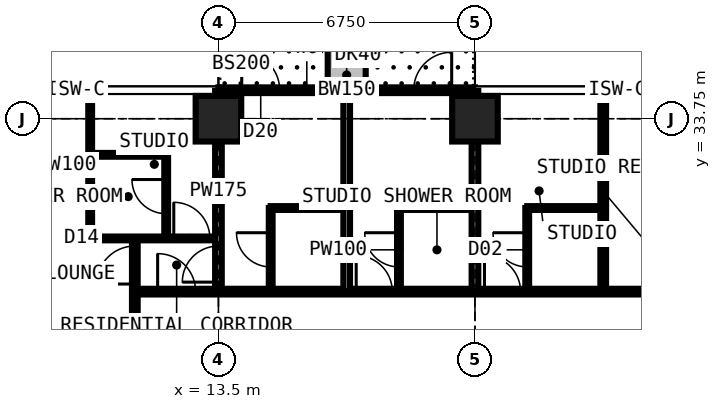
"""IFC4 building model, lengths in metres.
Left out: names, types, materials, properties, quantities, classifications, styles, units other than length and angle.
Written with IfcOpenShell. Run it as: python <this file> out.ifc"""

import sys

from ifc_helpers import new_model, si_unit, direction, frame, frame_2d, origin, origin_2d, place, context, subcontext, project, spatial, rectangle, extrude, element, fill, save


model = new_model("IFC4")
c1 = context("Model", 3, precision=1e-05, world=origin(), true_north=direction((0.0, 1.0)))
c2 = subcontext(c1, "Body", "Model", "MODEL_VIEW")
j1 = project(units=[si_unit("LENGTHUNIT", "METRE"), si_unit("PLANEANGLEUNIT", "RADIAN")], contexts=[c1])
p1 = place(None, origin())
s1 = spatial("IfcSite", under=j1, at=p1, CompositionType="ELEMENT")
p2 = place(p1, origin())
s2 = spatial("IfcBuilding", under=s1, at=p2, CompositionType="ELEMENT")
p3 = place(p2, frame((0.0, 0.0, 185.4)))
s3 = spatial("IfcBuildingStorey", under=s2, at=p3, CompositionType="ELEMENT", Elevation=185.4)
for number, where, z_axis, x_axis in (
    (1, (13.5, 33.75, 0.0), (0.0, 0.0, 1.0), (1.0, 0.0, 0.0)),
    (2, (20.25, 33.75, 0.0), (0.0, 0.0, 1.0), (1.0, 0.0, 0.0)),
):
    element("IfcColumn", number, at=place(p3, frame(where, z_axis=z_axis, x_axis=x_axis)), inside=s3, PredefinedType="COLUMN", context=c2, shape_type="SweptSolid", body=[
        extrude(rectangle(XDim=1.2, YDim=1.2, at=origin_2d()), origin(), (0.0, 0.0, 1.0), 3.6),
    ])
p4 = place(p3, frame((13.5, 34.5, 0.0), z_axis=(0.0, 0.0, 1.0), x_axis=(1.0, 0.0, 0.0)))
e3 = element("IfcWall", 3, at=p4, inside=s3, PredefinedType="SOLIDWALL", context=c2, shape_type="SweptSolid", body=[
    extrude(rectangle(XDim=6.75, YDim=0.15, at=frame_2d((3.375, 0.0))), origin(), (0.0, 0.0, 1.0), 3.375),
])
p5 = place(p4, frame((0.613, 0.0, 0.0)))
e4 = element("IfcOpeningElement", 4, at=p5, cuts=e3, PredefinedType="OPENING", context=c2, shape_type="SweptSolid", body=[
    extrude(rectangle(XDim=1.0, YDim=2.2, at=frame_2d((0.5, 1.1))), frame((0.0, 0.085, 0.0), z_axis=(0.0, -1.0, 0.0), x_axis=(1.0, 0.0, 0.0)), (0.0, 0.0, 1.0), 0.17),
])
p6 = place(p4, frame((1.725, 0.0, 0.9)))
e5 = element("IfcOpeningElement", 5, at=p6, cuts=e3, PredefinedType="OPENING", context=c2, shape_type="SweptSolid", body=[
    extrude(rectangle(XDim=1.2, YDim=1.8, at=frame_2d((0.6, 0.9))), frame((0.0, 0.085, 0.0), z_axis=(0.0, -1.0, 0.0), x_axis=(1.0, 0.0, 0.0)), (0.0, 0.0, 1.0), 0.17),
])
p7 = place(p4, frame((5.137, 0.0, 0.0)))
e6 = element("IfcOpeningElement", 6, at=p7, cuts=e3, PredefinedType="OPENING", context=c2, shape_type="SweptSolid", body=[
    extrude(rectangle(XDim=1.0, YDim=2.2, at=frame_2d((0.5, 1.1))), frame((0.0, 0.085, 0.0), z_axis=(0.0, -1.0, 0.0), x_axis=(1.0, 0.0, 0.0)), (0.0, 0.0, 1.0), 0.17),
])
p8 = place(p4, frame((3.825, 0.0, 0.9)))
e7 = element("IfcOpeningElement", 7, at=p8, cuts=e3, PredefinedType="OPENING", context=c2, shape_type="SweptSolid", body=[
    extrude(rectangle(XDim=1.2, YDim=1.8, at=frame_2d((0.6, 0.9))), frame((0.0, 0.085, 0.0), z_axis=(0.0, -1.0, 0.0), x_axis=(1.0, 0.0, 0.0)), (0.0, 0.0, 1.0), 0.17),
])
p9 = place(p3, frame((16.875, 34.6, 0.0), z_axis=(0.0, 0.0, 1.0), x_axis=(0.0, 1.0, 0.0)))
e8 = element("IfcWall", 8, at=p9, inside=s3, PredefinedType="USERDEFINED", context=c2, shape_type="SweptSolid", body=[
    extrude(rectangle(XDim=2.2, YDim=1.0, at=frame_2d((1.1, 0.0))), origin(), (0.0, 0.0, 1.0), 0.9),
])
p10 = place(p3, frame((10.125, 30.6, 0.0), z_axis=(0.0, 0.0, 1.0), x_axis=(0.0, 1.0, 0.0)))
e9 = element("IfcWall", 9, at=p10, inside=s3, PredefinedType="PARTITIONING", context=c2, shape_type="SweptSolid", body=[
    extrude(rectangle(XDim=3.884, YDim=0.1, at=frame_2d((1.942, 0.0))), origin(), (0.0, 0.0, 1.0), 3.375),
])
p11 = place(p3, frame((10.125, 30.6, 0.0), z_axis=(0.0, 0.0, 1.0), x_axis=(1.0, 0.0, 0.0)))
e10 = element("IfcWall", 10, at=p11, inside=s3, PredefinedType="PARTITIONING", context=c2, shape_type="SweptSolid", body=[
    extrude(rectangle(XDim=3.375, YDim=0.1, at=frame_2d((1.688, 0.0))), origin(), (0.0, 0.0, 1.0), 3.375),
])
p12 = place(p11, frame((2.2, 0.0, 0.0)))
e11 = element("IfcOpeningElement", 11, at=p12, cuts=e10, PredefinedType="OPENING", context=c2, shape_type="SweptSolid", body=[
    extrude(rectangle(XDim=0.95, YDim=2.2, at=frame_2d((0.475, 1.1))), frame((0.0, 0.06, 0.0), z_axis=(0.0, -1.0, 0.0), x_axis=(1.0, 0.0, 0.0)), (0.0, 0.0, 1.0), 0.12),
])
p13 = place(p3, frame((10.125, 32.8, 0.0), z_axis=(0.0, 0.0, 1.0), x_axis=(1.0, 0.0, 0.0)))
e12 = element("IfcWall", 12, at=p13, inside=s3, PredefinedType="PARTITIONING", context=c2, shape_type="SweptSolid", body=[
    extrude(rectangle(XDim=2.0, YDim=0.1, at=frame_2d((1.0, 0.0))), origin(), (0.0, 0.0, 1.0), 3.375),
])
p14 = place(p3, frame((11.3, 11.3, 0.0), z_axis=(0.0, 0.0, 1.0), x_axis=(0.0, 1.0, 0.0)))
e13 = element("IfcWall", 13, at=p14, inside=s3, PredefinedType="PARTITIONING", context=c2, shape_type="SweptSolid", body=[
    extrude(rectangle(XDim=19.3, YDim=0.15, at=frame_2d((9.65, 0.0))), origin(), (0.0, 0.0, 1.0), 3.375),
])
p15 = place(p14, frame((18.1, 0.0, 0.0)))
e14 = element("IfcOpeningElement", 14, at=p15, cuts=e13, PredefinedType="OPENING", context=c2, shape_type="SweptSolid", body=[
    extrude(rectangle(XDim=1.0, YDim=2.2, at=frame_2d((0.5, 1.1))), frame((0.0, 0.085, 0.0), z_axis=(0.0, -1.0, 0.0), x_axis=(1.0, 0.0, 0.0)), (0.0, 0.0, 1.0), 0.17),
])
p16 = place(p14, frame((10.137, 0.0, 0.0)))
e15 = element("IfcOpeningElement", 15, at=p16, cuts=e13, PredefinedType="OPENING", context=c2, shape_type="SweptSolid", body=[
    extrude(rectangle(XDim=1.0, YDim=2.2, at=frame_2d((0.5, 1.1))), frame((0.0, 0.085, 0.0), z_axis=(0.0, -1.0, 0.0), x_axis=(1.0, 0.0, 0.0)), (0.0, 0.0, 1.0), 0.17),
])
p17 = place(p3, frame((11.3, 29.2, 0.0), z_axis=(0.0, 0.0, 1.0), x_axis=(1.0, 0.0, 0.0)))
e16 = element("IfcWall", 16, at=p17, inside=s3, PredefinedType="PARTITIONING", context=c2, shape_type="SweptSolid", body=[
    extrude(rectangle(XDim=19.809, YDim=0.15, at=frame_2d((9.904, 0.0))), origin(), (0.0, 0.0, 1.0), 3.375),
])
p18 = place(p17, frame((14.625, 0.0, 0.0)))
e17 = element("IfcOpeningElement", 17, at=p18, cuts=e16, PredefinedType="OPENING", context=c2, shape_type="SweptSolid", body=[
    extrude(rectangle(XDim=1.0, YDim=2.2, at=frame_2d((0.5, 1.1))), frame((0.0, 0.085, 0.0), z_axis=(0.0, -1.0, 0.0), x_axis=(1.0, 0.0, 0.0)), (0.0, 0.0, 1.0), 0.17),
])
p19 = place(p17, frame((5.825, 0.0, 0.0)))
e18 = element("IfcOpeningElement", 18, at=p19, cuts=e16, PredefinedType="OPENING", context=c2, shape_type="SweptSolid", body=[
    extrude(rectangle(XDim=0.95, YDim=2.2, at=frame_2d((0.475, 1.1))), frame((0.0, 0.085, 0.0), z_axis=(0.0, -1.0, 0.0), x_axis=(1.0, 0.0, 0.0)), (0.0, 0.0, 1.0), 0.17),
])
p20 = place(p17, frame((9.2, 0.0, 0.0)))
e19 = element("IfcOpeningElement", 19, at=p20, cuts=e16, PredefinedType="OPENING", context=c2, shape_type="SweptSolid", body=[
    extrude(rectangle(XDim=0.95, YDim=2.2, at=frame_2d((0.475, 1.1))), frame((0.0, 0.085, 0.0), z_axis=(0.0, -1.0, 0.0), x_axis=(1.0, 0.0, 0.0)), (0.0, 0.0, 1.0), 0.17),
])
p21 = place(p17, frame((0.6, 0.0, 0.0)))
e20 = element("IfcOpeningElement", 20, at=p21, cuts=e16, PredefinedType="OPENING", context=c2, shape_type="SweptSolid", body=[
    extrude(rectangle(XDim=1.0, YDim=2.2, at=frame_2d((0.5, 1.1))), frame((0.0, 0.085, 0.0), z_axis=(0.0, -1.0, 0.0), x_axis=(1.0, 0.0, 0.0)), (0.0, 0.0, 1.0), 0.17),
])
p22 = place(p3, frame((12.125, 30.6, 0.0), z_axis=(0.0, 0.0, 1.0), x_axis=(0.0, 1.0, 0.0)))
e21 = element("IfcWall", 21, at=p22, inside=s3, PredefinedType="PARTITIONING", context=c2, shape_type="SweptSolid", body=[
    extrude(rectangle(XDim=2.2, YDim=0.1, at=frame_2d((1.1, 0.0))), origin(), (0.0, 0.0, 1.0), 3.375),
])
p23 = place(p22, frame((0.65, 0.0, 0.0)))
e22 = element("IfcOpeningElement", 22, at=p23, cuts=e21, PredefinedType="OPENING", context=c2, shape_type="SweptSolid", body=[
    extrude(rectangle(XDim=0.9, YDim=2.2, at=frame_2d((0.45, 1.1))), frame((0.0, 0.06, 0.0), z_axis=(0.0, -1.0, 0.0), x_axis=(1.0, 0.0, 0.0)), (0.0, 0.0, 1.0), 0.12),
])
p24 = place(p3, frame((13.5, 29.2, 0.0), z_axis=(0.0, 0.0, 1.0), x_axis=(0.0, 1.0, 0.0)))
e23 = element("IfcWall", 23, at=p24, inside=s3, PredefinedType="PARTITIONING", context=c2, shape_type="SweptSolid", body=[
    extrude(rectangle(XDim=5.284, YDim=0.175, at=frame_2d((2.642, 0.0))), origin(), (0.0, 0.0, 1.0), 2.806),
])
p25 = place(p24, frame((0.25, 0.0, 0.0)))
e24 = element("IfcOpeningElement", 24, at=p25, cuts=e23, PredefinedType="OPENING", context=c2, shape_type="SweptSolid", body=[
    extrude(rectangle(XDim=0.95, YDim=2.2, at=frame_2d((0.475, 1.1))), frame((0.0, 0.097, 0.0), z_axis=(0.0, -1.0, 0.0), x_axis=(1.0, 0.0, 0.0)), (0.0, 0.0, 1.0), 0.195),
])
p26 = place(p3, frame((14.875, 29.2, 0.0), z_axis=(0.0, 0.0, 1.0), x_axis=(0.0, 1.0, 0.0)))
e25 = element("IfcWall", 25, at=p26, inside=s3, PredefinedType="PARTITIONING", context=c2, shape_type="SweptSolid", body=[
    extrude(rectangle(XDim=2.2, YDim=0.1, at=frame_2d((1.1, 0.0))), origin(), (0.0, 0.0, 1.0), 3.375),
])
p27 = place(p26, frame((0.65, 0.0, 0.0)))
e26 = element("IfcOpeningElement", 26, at=p27, cuts=e25, PredefinedType="OPENING", context=c2, shape_type="SweptSolid", body=[
    extrude(rectangle(XDim=0.9, YDim=2.2, at=frame_2d((0.45, 1.1))), frame((0.0, 0.06, 0.0), z_axis=(0.0, -1.0, 0.0), x_axis=(1.0, 0.0, 0.0)), (0.0, 0.0, 1.0), 0.12),
])
p28 = place(p3, frame((14.875, 31.4, 0.0), z_axis=(0.0, 0.0, 1.0), x_axis=(1.0, 0.0, 0.0)))
e27 = element("IfcWall", 27, at=p28, inside=s3, PredefinedType="PARTITIONING", context=c2, shape_type="SweptSolid", body=[
    extrude(rectangle(XDim=2.0, YDim=0.1, at=frame_2d((1.0, 0.0))), origin(), (0.0, 0.0, 1.0), 3.375),
])
p29 = place(p3, frame((16.875, 29.2, 0.0), z_axis=(0.0, 0.0, 1.0), x_axis=(0.0, 1.0, 0.0)))
e28 = element("IfcWall", 28, at=p29, inside=s3, PredefinedType="PARTITIONING", context=c2, shape_type="SweptSolid", body=[
    extrude(rectangle(XDim=5.284, YDim=0.175, at=frame_2d((2.642, 0.0))), origin(), (0.0, 0.0, 1.0), 3.375),
])
p30 = place(p3, frame((18.25, 29.2, 0.0), z_axis=(0.0, 0.0, 1.0), x_axis=(0.0, 1.0, 0.0)))
e29 = element("IfcWall", 29, at=p30, inside=s3, PredefinedType="PARTITIONING", context=c2, shape_type="SweptSolid", body=[
    extrude(rectangle(XDim=2.2, YDim=0.1, at=frame_2d((1.1, 0.0))), origin(), (0.0, 0.0, 1.0), 3.375),
])
p31 = place(p30, frame((0.65, 0.0, 0.0)))
e30 = element("IfcOpeningElement", 30, at=p31, cuts=e29, PredefinedType="OPENING", context=c2, shape_type="SweptSolid", body=[
    extrude(rectangle(XDim=0.9, YDim=2.2, at=frame_2d((0.45, 1.1))), frame((0.0, 0.06, 0.0), z_axis=(0.0, -1.0, 0.0), x_axis=(1.0, 0.0, 0.0)), (0.0, 0.0, 1.0), 0.12),
])
p32 = place(p3, frame((18.25, 31.4, 0.0), z_axis=(0.0, 0.0, 1.0), x_axis=(1.0, 0.0, 0.0)))
e31 = element("IfcWall", 31, at=p32, inside=s3, PredefinedType="PARTITIONING", context=c2, shape_type="SweptSolid", body=[
    extrude(rectangle(XDim=2.0, YDim=0.1, at=frame_2d((1.0, 0.0))), origin(), (0.0, 0.0, 1.0), 3.375),
])
p33 = place(p3, frame((20.25, 29.2, 0.0), z_axis=(0.0, 0.0, 1.0), x_axis=(0.0, 1.0, 0.0)))
e32 = element("IfcWall", 32, at=p33, inside=s3, PredefinedType="PARTITIONING", context=c2, shape_type="SweptSolid", body=[
    extrude(rectangle(XDim=5.284, YDim=0.175, at=frame_2d((2.642, 0.0))), origin(), (0.0, 0.0, 1.0), 2.806),
])
p34 = place(p3, frame((21.625, 29.2, 0.0), z_axis=(0.0, 0.0, 1.0), x_axis=(0.0, 1.0, 0.0)))
e33 = element("IfcWall", 33, at=p34, inside=s3, PredefinedType="PARTITIONING", context=c2, shape_type="SweptSolid", body=[
    extrude(rectangle(XDim=2.2, YDim=0.1, at=frame_2d((1.1, 0.0))), origin(), (0.0, 0.0, 1.0), 3.375),
])
p35 = place(p34, frame((0.65, 0.0, 0.0)))
e34 = element("IfcOpeningElement", 34, at=p35, cuts=e33, PredefinedType="OPENING", context=c2, shape_type="SweptSolid", body=[
    extrude(rectangle(XDim=0.9, YDim=2.2, at=frame_2d((0.45, 1.1))), frame((0.0, 0.06, 0.0), z_axis=(0.0, -1.0, 0.0), x_axis=(1.0, 0.0, 0.0)), (0.0, 0.0, 1.0), 0.12),
])
p36 = place(p3, frame((21.625, 31.4, 0.0), z_axis=(0.0, 0.0, 1.0), x_axis=(1.0, 0.0, 0.0)))
e35 = element("IfcWall", 35, at=p36, inside=s3, PredefinedType="PARTITIONING", context=c2, shape_type="SweptSolid", body=[
    extrude(rectangle(XDim=2.0, YDim=0.1, at=frame_2d((1.0, 0.0))), origin(), (0.0, 0.0, 1.0), 3.375),
])
p37 = place(p3, frame((23.625, 29.2, 0.0), z_axis=(0.0, 0.0, 1.0), x_axis=(0.0, 1.0, 0.0)))
e36 = element("IfcWall", 36, at=p37, inside=s3, PredefinedType="PARTITIONING", context=c2, shape_type="SweptSolid", body=[
    extrude(rectangle(XDim=5.284, YDim=0.15, at=frame_2d((2.642, 0.0))), origin(), (0.0, 0.0, 1.0), 3.375),
])
p38 = place(p5, origin())
e37 = element("IfcDoor", 37, at=p38, inside=s3, OperationType="SINGLE_SWING_LEFT", PredefinedType="DOOR", context=c2, shape_type="SweptSolid", body=[
    extrude(rectangle(XDim=1.0, YDim=2.2, at=frame_2d((0.5, 1.1))), frame((0.0, 0.025, 0.0), z_axis=(0.0, -1.0, 0.0), x_axis=(1.0, 0.0, 0.0)), (0.0, 0.0, 1.0), 0.05),
])
fill(e4, e37)
p39 = place(p6, origin())
e38 = element("IfcWindow", 38, at=p39, inside=s3, PartitioningType="SINGLE_PANEL", PredefinedType="WINDOW", context=c2, shape_type="SweptSolid", body=[
    extrude(rectangle(XDim=1.2, YDim=1.8, at=frame_2d((0.6, 0.9))), frame((0.0, 0.03, 0.0), z_axis=(0.0, -1.0, 0.0), x_axis=(1.0, 0.0, 0.0)), (0.0, 0.0, 1.0), 0.06),
])
fill(e5, e38)
p40 = place(p7, origin())
e39 = element("IfcDoor", 39, at=p40, inside=s3, OperationType="SINGLE_SWING_RIGHT", PredefinedType="DOOR", context=c2, shape_type="SweptSolid", body=[
    extrude(rectangle(XDim=1.0, YDim=2.2, at=frame_2d((0.5, 1.1))), frame((0.0, 0.025, 0.0), z_axis=(0.0, -1.0, 0.0), x_axis=(1.0, 0.0, 0.0)), (0.0, 0.0, 1.0), 0.05),
])
fill(e6, e39)
p41 = place(p8, origin())
e40 = element("IfcWindow", 40, at=p41, inside=s3, PartitioningType="SINGLE_PANEL", PredefinedType="WINDOW", context=c2, shape_type="SweptSolid", body=[
    extrude(rectangle(XDim=1.2, YDim=1.8, at=frame_2d((0.6, 0.9))), frame((0.0, 0.03, 0.0), z_axis=(0.0, -1.0, 0.0), x_axis=(1.0, 0.0, 0.0)), (0.0, 0.0, 1.0), 0.06),
])
fill(e7, e40)
p42 = place(p12, origin())
e41 = element("IfcDoor", 41, at=p42, inside=s3, OperationType="SINGLE_SWING_LEFT", PredefinedType="DOOR", context=c2, shape_type="SweptSolid", body=[
    extrude(rectangle(XDim=0.95, YDim=2.2, at=frame_2d((0.475, 1.1))), frame((0.0, 0.025, 0.0), z_axis=(0.0, -1.0, 0.0), x_axis=(1.0, 0.0, 0.0)), (0.0, 0.0, 1.0), 0.05),
])
fill(e11, e41)
p43 = place(p23, origin())
e42 = element("IfcDoor", 42, at=p43, inside=s3, OperationType="SINGLE_SWING_RIGHT", PredefinedType="DOOR", context=c2, shape_type="SweptSolid", body=[
    extrude(rectangle(XDim=0.9, YDim=2.2, at=frame_2d((0.45, 1.1))), frame((0.0, 0.025, 0.0), z_axis=(0.0, -1.0, 0.0), x_axis=(1.0, 0.0, 0.0)), (0.0, 0.0, 1.0), 0.05),
])
fill(e22, e42)
p44 = place(p25, origin())
e43 = element("IfcDoor", 43, at=p44, inside=s3, OperationType="SINGLE_SWING_LEFT", PredefinedType="DOOR", context=c2, shape_type="SweptSolid", body=[
    extrude(rectangle(XDim=0.95, YDim=2.2, at=frame_2d((0.475, 1.1))), frame((0.0, 0.025, 0.0), z_axis=(0.0, -1.0, 0.0), x_axis=(1.0, 0.0, 0.0)), (0.0, 0.0, 1.0), 0.05),
])
fill(e24, e43)
p45 = place(p27, origin())
e44 = element("IfcDoor", 44, at=p45, inside=s3, OperationType="SINGLE_SWING_RIGHT", PredefinedType="DOOR", context=c2, shape_type="SweptSolid", body=[
    extrude(rectangle(XDim=0.9, YDim=2.2, at=frame_2d((0.45, 1.1))), frame((0.0, 0.025, 0.0), z_axis=(0.0, -1.0, 0.0), x_axis=(1.0, 0.0, 0.0)), (0.0, 0.0, 1.0), 0.05),
])
fill(e26, e44)
p46 = place(p19, origin())
e45 = element("IfcDoor", 45, at=p46, inside=s3, OperationType="SINGLE_SWING_LEFT", PredefinedType="DOOR", context=c2, shape_type="SweptSolid", body=[
    extrude(rectangle(XDim=0.95, YDim=2.2, at=frame_2d((0.475, 1.1))), frame((0.0, 0.025, 0.0), z_axis=(0.0, -1.0, 0.0), x_axis=(1.0, 0.0, 0.0)), (0.0, 0.0, 1.0), 0.05),
])
fill(e18, e45)
p47 = place(p31, origin())
e46 = element("IfcDoor", 46, at=p47, inside=s3, OperationType="SINGLE_SWING_RIGHT", PredefinedType="DOOR", context=c2, shape_type="SweptSolid", body=[
    extrude(rectangle(XDim=0.9, YDim=2.2, at=frame_2d((0.45, 1.1))), frame((0.0, 0.025, 0.0), z_axis=(0.0, -1.0, 0.0), x_axis=(1.0, 0.0, 0.0)), (0.0, 0.0, 1.0), 0.05),
])
fill(e30, e46)
p48 = place(p20, origin())
e47 = element("IfcDoor", 47, at=p48, inside=s3, OperationType="SINGLE_SWING_LEFT", PredefinedType="DOOR", context=c2, shape_type="SweptSolid", body=[
    extrude(rectangle(XDim=0.95, YDim=2.2, at=frame_2d((0.475, 1.1))), frame((0.0, 0.025, 0.0), z_axis=(0.0, -1.0, 0.0), x_axis=(1.0, 0.0, 0.0)), (0.0, 0.0, 1.0), 0.05),
])
fill(e19, e47)
p49 = place(p35, origin())
e48 = element("IfcDoor", 48, at=p49, inside=s3, OperationType="SINGLE_SWING_RIGHT", PredefinedType="DOOR", context=c2, shape_type="SweptSolid", body=[
    extrude(rectangle(XDim=0.9, YDim=2.2, at=frame_2d((0.45, 1.1))), frame((0.0, 0.025, 0.0), z_axis=(0.0, -1.0, 0.0), x_axis=(1.0, 0.0, 0.0)), (0.0, 0.0, 1.0), 0.05),
])
fill(e34, e48)
p50 = place(p21, origin())
e49 = element("IfcDoor", 49, at=p50, inside=s3, OperationType="SINGLE_SWING_LEFT", PredefinedType="DOOR", context=c2, shape_type="SweptSolid", body=[
    extrude(rectangle(XDim=1.0, YDim=2.2, at=frame_2d((0.5, 1.1))), frame((0.0, 0.025, 0.0), z_axis=(0.0, -1.0, 0.0), x_axis=(1.0, 0.0, 0.0)), (0.0, 0.0, 1.0), 0.05),
])
fill(e20, e49)
p51 = place(p15, origin())
e50 = element("IfcDoor", 50, at=p51, inside=s3, OperationType="SINGLE_SWING_LEFT", PredefinedType="DOOR", context=c2, shape_type="SweptSolid", body=[
    extrude(rectangle(XDim=1.0, YDim=2.2, at=frame_2d((0.5, 1.1))), frame((0.0, 0.025, 0.0), z_axis=(0.0, -1.0, 0.0), x_axis=(1.0, 0.0, 0.0)), (0.0, 0.0, 1.0), 0.05),
])
fill(e14, e50)
save(model, sys.argv[1])
